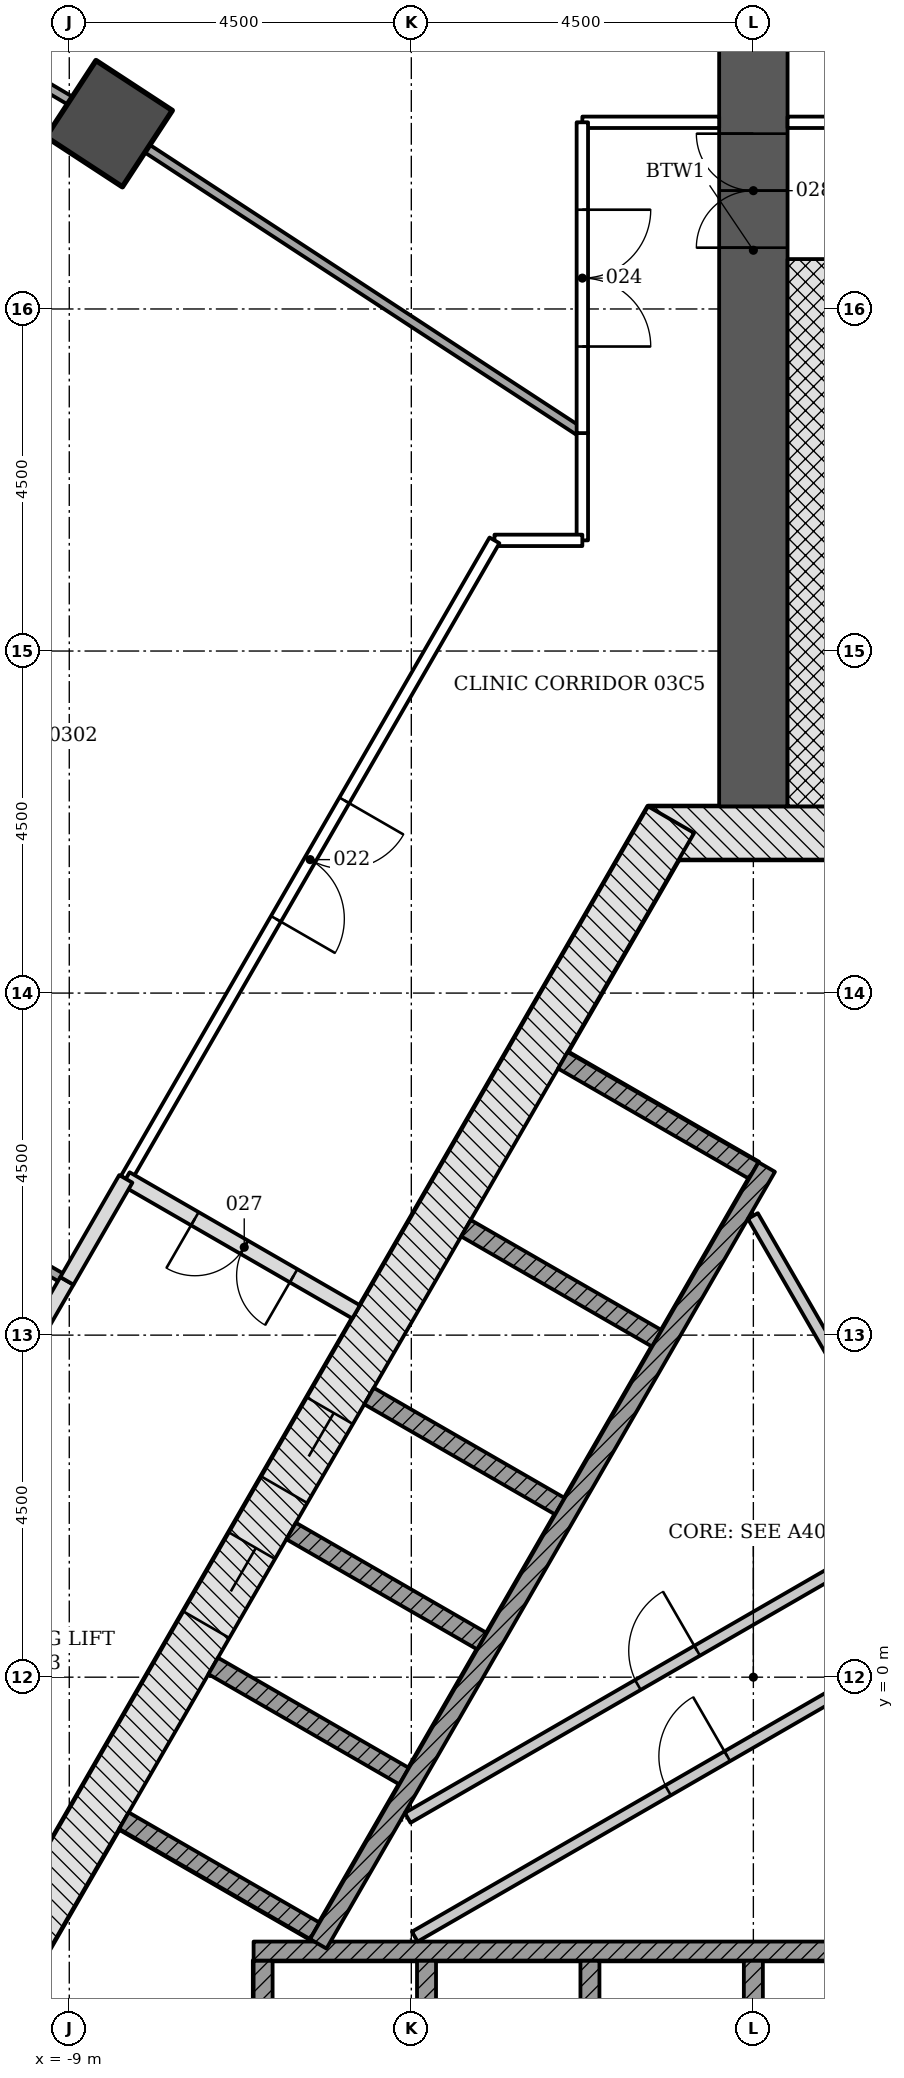
"""IFC4 building model, lengths in metres.
Left out: names, types, materials, properties, quantities, classifications, styles, units other than length and angle.
Written with IfcOpenShell. Run it as: python <this file> out.ifc"""

import sys

from ifc_helpers import new_model, si_unit, direction, frame, frame_2d, origin, origin_2d, place, context, subcontext, project, spatial, rectangle, extrude, element, fill, save


model = new_model("IFC4")
c1 = context("Model", 3, precision=1e-05, world=origin(), true_north=direction((0.0, 1.0)))
c2 = subcontext(c1, "Body", "Model", "MODEL_VIEW")
j1 = project(units=[si_unit("LENGTHUNIT", "METRE"), si_unit("PLANEANGLEUNIT", "RADIAN")], contexts=[c1])
p1 = place(None, origin())
s1 = spatial("IfcSite", under=j1, at=p1, CompositionType="ELEMENT")
p2 = place(p1, origin())
s2 = spatial("IfcBuilding", under=s1, at=p2, CompositionType="ELEMENT")
p3 = place(p2, frame((0.0, 0.0, 15.0)))
s3 = spatial("IfcBuildingStorey", under=s2, at=p3, CompositionType="ELEMENT", Elevation=15.0)
p4 = place(p3, frame((-8.475, 20.438, -0.25), z_axis=(0.0, 0.0, 1.0), x_axis=(-0.836867705394, 0.547405191489, 0.0)))
e1 = element("IfcColumn", 1, at=p4, inside=s3, PredefinedType="COLUMN", context=c2, shape_type="SweptSolid", body=[
    extrude(rectangle(XDim=1.2, YDim=1.2, at=origin_2d()), origin(), (0.0, 0.0, 1.0), 4.5),
])
p5 = place(p3, frame((10.311, -4.703, -0.25), z_axis=(0.0, 0.0, 1.0), x_axis=(-0.500001446645, 0.866024568562, 0.0)))
e2 = element("IfcWall", 2, at=p5, inside=s3, PredefinedType="SHEAR", context=c2, shape_type="SweptSolid", body=[
    extrude(rectangle(XDim=18.458, YDim=0.7, at=frame_2d((9.229, 0.0))), origin(), (0.0, 0.0, 1.0), 4.5),
])
p6 = place(p5, frame((8.7, 0.0, 0.25)))
e3 = element("IfcOpeningElement", 3, at=p6, cuts=e2, PredefinedType="OPENING", context=c2, shape_type="SweptSolid", body=[
    extrude(rectangle(XDim=1.0, YDim=2.1, at=frame_2d((0.5, 1.05))), frame((0.0, 0.36, 0.0), z_axis=(0.0, -1.0, 0.0), x_axis=(1.0, 0.0, 0.0)), (0.0, 0.0, 1.0), 0.72),
])
p7 = place(p5, frame((4.002, 0.0, 0.25)))
e4 = element("IfcOpeningElement", 4, at=p7, cuts=e2, PredefinedType="OPENING", context=c2, shape_type="SweptSolid", body=[
    extrude(rectangle(XDim=0.9, YDim=2.1, at=frame_2d((0.45, 1.05))), frame((0.0, 0.36, 0.0), z_axis=(0.0, -1.0, 0.0), x_axis=(1.0, 0.0, 0.0)), (0.0, 0.0, 1.0), 0.72),
])
p8 = place(p5, frame((14.093, 0.0, 0.25)))
e5 = element("IfcOpeningElement", 5, at=p8, cuts=e2, PredefinedType="OPENING", context=c2, shape_type="SweptSolid", body=[
    extrude(rectangle(XDim=0.9, YDim=2.1, at=frame_2d((0.45, 1.05))), frame((0.0, 0.36, 0.0), z_axis=(0.0, -1.0, 0.0), x_axis=(1.0, 0.0, 0.0)), (0.0, 0.0, 1.0), 0.72),
])
p9 = place(p3, frame((1.386, 11.106, -0.25), z_axis=(0.0, 0.0, 1.0), x_axis=(-1.0, 0.0, 0.0)))
e6 = element("IfcWall", 6, at=p9, inside=s3, PredefinedType="SHEAR", context=c2, shape_type="SweptSolid", body=[
    extrude(rectangle(XDim=2.771, YDim=0.7, at=frame_2d((1.386, 0.0))), origin(), (0.0, 0.0, 1.0), 4.5),
])
p10 = place(p3, frame((-1.083, 11.281, -0.25), z_axis=(0.0, 0.0, 1.0), x_axis=(-0.500001446645, -0.866024568562, 0.0)))
e7 = element("IfcWall", 7, at=p10, inside=s3, PredefinedType="SHEAR", context=c2, shape_type="SweptSolid", body=[
    extrude(rectangle(XDim=18.458, YDim=0.7, at=frame_2d((9.229, 0.0))), origin(), (0.0, 0.0, 1.0), 4.5),
])
p11 = place(p10, frame((8.979, 0.0, 0.25)))
e8 = element("IfcOpeningElement", 8, at=p11, cuts=e7, PredefinedType="OPENING", context=c2, shape_type="SweptSolid", body=[
    extrude(rectangle(XDim=1.2, YDim=2.1, at=frame_2d((0.6, 1.05))), frame((0.0, 0.36, 0.0), z_axis=(0.0, -1.0, 0.0), x_axis=(1.0, 0.0, 0.0)), (0.0, 0.0, 1.0), 0.72),
])
p12 = place(p10, frame((11.029, 0.0, 0.25)))
e9 = element("IfcOpeningElement", 9, at=p12, cuts=e7, PredefinedType="OPENING", context=c2, shape_type="SweptSolid", body=[
    extrude(rectangle(XDim=1.2, YDim=2.1, at=frame_2d((0.6, 1.05))), frame((0.0, 0.36, 0.0), z_axis=(0.0, -1.0, 0.0), x_axis=(1.0, 0.0, 0.0)), (0.0, 0.0, 1.0), 0.72),
])
p13 = place(p3, frame((-10.311, -4.353, -0.25), z_axis=(0.0, 0.0, 1.0), x_axis=(0.500042739161, -0.866000726912, 0.0)))
e10 = element("IfcWall", 10, at=p13, inside=s3, PredefinedType="SHEAR", context=c2, shape_type="SweptSolid", body=[
    extrude(rectangle(XDim=2.771, YDim=0.7, at=frame_2d((1.386, 0.0))), origin(), (0.0, 0.0, 1.0), 4.5),
])
p14 = place(p3, frame((0.0, 11.456, -0.25), z_axis=(0.0, 0.0, 1.0), x_axis=(0.0, 1.0, 0.0)))
e11 = element("IfcWall", 11, at=p14, inside=s3, PredefinedType="SHEAR", context=c2, shape_type="SweptSolid", body=[
    extrude(rectangle(XDim=14.633, YDim=0.9, at=frame_2d((7.316, 0.0))), origin(), (0.0, 0.0, 1.0), 4.5),
])
p15 = place(p14, frame((7.35, 0.0, 0.25)))
e12 = element("IfcOpeningElement", 12, at=p15, cuts=e11, PredefinedType="OPENING", context=c2, shape_type="SweptSolid", body=[
    extrude(rectangle(XDim=1.5, YDim=2.1, at=frame_2d((0.75, 1.05))), frame((0.0, 0.46, 0.0), z_axis=(0.0, -1.0, 0.0), x_axis=(1.0, 0.0, 0.0)), (0.0, 0.0, 1.0), 0.92),
])
for number, where, z_axis, x_axis in (
    (13, (-6.45, -6.228, -0.25), (0.0, 0.0, 1.0), (0.0, 1.0, 0.0)),
    (14, (-4.3, -6.228, -0.25), (0.0, 0.0, 1.0), (0.0, 1.0, 0.0)),
    (15, (-2.15, -6.228, -0.25), (0.0, 0.0, 1.0), (0.0, 1.0, 0.0)),
    (16, (0.0, -6.228, -0.25), (0.0, 0.0, 1.0), (0.0, 1.0, 0.0)),
):
    element("IfcWall", number, at=place(p3, frame(where, z_axis=z_axis, x_axis=x_axis)), inside=s3, PredefinedType="PARTITIONING", context=c2, shape_type="SweptSolid", body=[
        extrude(rectangle(XDim=2.5, YDim=0.25, at=frame_2d((1.25, 0.0))), origin(), (0.0, 0.0, 1.0), 4.5),
    ])
p16 = place(p3, frame((-6.575, -3.603, 0.0), z_axis=(0.0, 0.0, 1.0), x_axis=(1.0, 0.0, 0.0)))
e17 = element("IfcWall", 17, at=p16, inside=s3, PredefinedType="PARTITIONING", context=c2, shape_type="SweptSolid", body=[
    extrude(rectangle(XDim=13.15, YDim=0.25, at=frame_2d((6.575, 0.0))), origin(), (0.0, 0.0, 1.0), 4.25),
])
p17 = place(p3, frame((-2.506, 8.115, -0.25), z_axis=(0.0, 0.0, 1.0), x_axis=(0.865996321171, -0.50005036918, 0.0)))
e18 = element("IfcWall", 18, at=p17, inside=s3, PredefinedType="PARTITIONING", context=c2, shape_type="SweptSolid", body=[
    extrude(rectangle(XDim=2.9, YDim=0.25, at=frame_2d((1.45, 0.0))), origin(), (0.0, 0.0, 1.0), 4.5),
])
for number, where, z_axis, x_axis in (
    (19, (-3.781, 5.907, -0.25), (0.0, 0.0, 1.0), (0.866, -0.5, 0.0)),
    (20, (-5.056, 3.699, -0.25), (0.0, 0.0, 1.0), (0.866, -0.5, 0.0)),
    (21, (-6.081, 1.923, -0.25), (0.0, 0.0, 1.0), (0.866, -0.5, 0.0)),
    (22, (-7.106, 0.148, -0.25), (0.0, 0.0, 1.0), (0.866, -0.5, 0.0)),
    (23, (-8.281, -1.887, -0.25), (0.0, 0.0, 1.0), (0.866, -0.5, 0.0)),
):
    element("IfcWall", number, at=place(p3, frame(where, z_axis=z_axis, x_axis=x_axis)), inside=s3, PredefinedType="PARTITIONING", context=c2, shape_type="SweptSolid", body=[
        extrude(rectangle(XDim=2.9, YDim=0.25, at=frame_2d((1.45, 0.0))), origin(), (0.0, 0.0, 1.0), 4.5),
    ])
p18 = place(p3, frame((0.176, 6.711, 0.0), z_axis=(0.0, 0.0, 1.0), x_axis=(-0.500004227369, -0.866022963098, 0.0)))
e24 = element("IfcWall", 24, at=p18, inside=s3, PredefinedType="PARTITIONING", context=c2, shape_type="SweptSolid", body=[
    extrude(rectangle(XDim=11.8, YDim=0.25, at=frame_2d((5.9, 0.0))), origin(), (0.0, 0.0, 1.0), 4.25),
])
p19 = place(p3, frame((-4.548, -1.851, 0.0), z_axis=(0.0, 0.0, 1.0), x_axis=(0.866023939251, 0.500002536638, 0.0)))
e25 = element("IfcWall", 25, at=p19, inside=s3, PredefinedType="PARTITIONING", context=c2, shape_type="SweptSolid", body=[
    extrude(rectangle(XDim=11.092, YDim=0.15, at=frame_2d((5.546, 0.0))), origin(), (0.0, 0.0, 1.0), 4.25),
])
p20 = place(p19, frame((3.497, 0.0, 0.0)))
e26 = element("IfcOpeningElement", 26, at=p20, cuts=e25, PredefinedType="OPENING", context=c2, shape_type="SweptSolid", body=[
    extrude(rectangle(XDim=0.9, YDim=2.1, at=frame_2d((0.45, 1.05))), frame((0.0, 0.085, 0.0), z_axis=(0.0, -1.0, 0.0), x_axis=(1.0, 0.0, 0.0)), (0.0, 0.0, 1.0), 0.17),
])
p21 = place(p3, frame((2.099, 2.42, 0.0), z_axis=(0.0, 0.0, 1.0), x_axis=(-0.499998449073, 0.866026299211, 0.0)))
e27 = element("IfcWall", 27, at=p21, inside=s3, PredefinedType="PARTITIONING", context=c2, shape_type="SweptSolid", body=[
    extrude(rectangle(XDim=4.211, YDim=0.15, at=frame_2d((2.106, 0.0))), origin(), (0.0, 0.0, 1.0), 4.25),
])
p22 = place(p3, frame((-4.454, -3.413, 0.0), z_axis=(0.0, 0.0, 1.0), x_axis=(0.86603043987, 0.499991277142, 0.0)))
e28 = element("IfcWall", 28, at=p22, inside=s3, PredefinedType="PARTITIONING", context=c2, shape_type="SweptSolid", body=[
    extrude(rectangle(XDim=11.792, YDim=0.15, at=frame_2d((5.896, 0.0))), origin(), (0.0, 0.0, 1.0), 4.25),
])
p23 = place(p22, frame((3.847, 0.0, 0.0)))
e29 = element("IfcOpeningElement", 29, at=p23, cuts=e28, PredefinedType="OPENING", context=c2, shape_type="SweptSolid", body=[
    extrude(rectangle(XDim=0.9, YDim=2.1, at=frame_2d((0.45, 1.05))), frame((0.0, 0.085, 0.0), z_axis=(0.0, -1.0, 0.0), x_axis=(1.0, 0.0, 0.0)), (0.0, 0.0, 1.0), 0.17),
])
p24 = place(p3, frame((1.018, 11.456, -0.25), z_axis=(0.0, 0.0, 1.0), x_axis=(0.0, 1.0, 0.0)))
e30 = element("IfcWall", 30, at=p24, inside=s3, PredefinedType="SHEAR", context=c2, shape_type="SweptSolid", body=[
    extrude(rectangle(XDim=7.2, YDim=1.136, at=frame_2d((3.6, 0.0))), origin(), (0.0, 0.0, 1.0), 4.5),
])
p25 = place(p3, frame((-9.032, 5.213, 0.0), z_axis=(0.0, 0.0, 1.0), x_axis=(-0.499876332206, -0.866096791646, 0.0)))
e31 = element("IfcWall", 31, at=p25, inside=s3, PredefinedType="PARTITIONING", context=c2, shape_type="SweptSolid", body=[
    extrude(rectangle(XDim=4.349, YDim=0.2, at=frame_2d((2.175, 0.0))), origin(), (0.0, 0.0, 1.0), 3.638),
])
p26 = place(p3, frame((-5.226, 4.806, 0.0), z_axis=(0.0, 0.0, 1.0), x_axis=(-0.865949687125, 0.500131122175, 0.0)))
e32 = element("IfcWall", 32, at=p26, inside=s3, PredefinedType="PARTITIONING", context=c2, shape_type="SweptSolid", body=[
    extrude(rectangle(XDim=3.499, YDim=0.2, at=frame_2d((1.75, 0.0))), origin(), (0.0, 0.0, 1.0), 4.25),
])
p27 = place(p26, frame((0.95, 0.0, 0.0)))
e33 = element("IfcOpeningElement", 33, at=p27, cuts=e32, PredefinedType="OPENING", context=c2, shape_type="SweptSolid", body=[
    extrude(rectangle(XDim=1.5, YDim=2.1, at=frame_2d((0.75, 1.05))), frame((0.0, 0.11, 0.0), z_axis=(0.0, -1.0, 0.0), x_axis=(1.0, 0.0, 0.0)), (0.0, 0.0, 1.0), 0.22),
])
p28 = place(p3, frame((-8.256, 6.556, 0.0), z_axis=(0.0, 0.0, 1.0), x_axis=(-0.500104332946, -0.86596515875, 0.0)))
e34 = element("IfcWall", 34, at=p28, inside=s3, PredefinedType="PARTITIONING", context=c2, shape_type="SweptSolid", body=[
    extrude(rectangle(XDim=1.55, YDim=0.2, at=frame_2d((0.775, 0.0))), origin(), (0.0, 0.0, 1.0), 3.638),
])
p29 = place(p3, frame((7.136, 20.456, 0.0), z_axis=(0.0, 0.0, 1.0), x_axis=(-1.0, 0.0, 0.0)))
e35 = element("IfcWall", 35, at=p29, inside=s3, PredefinedType="PARTITIONING", context=c2, shape_type="SweptSolid", body=[
    extrude(rectangle(XDim=6.686, YDim=0.15, at=frame_2d((3.343, 0.0))), origin(), (0.0, 0.0, 1.0), 3.638),
])
p30 = place(p29, frame((2.45, 0.0, 0.0)))
e36 = element("IfcOpeningElement", 36, at=p30, cuts=e35, PredefinedType="OPENING", context=c2, shape_type="SweptSolid", body=[
    extrude(rectangle(XDim=1.8, YDim=2.1, at=frame_2d((0.9, 1.05))), frame((0.0, 0.085, 0.0), z_axis=(0.0, -1.0, 0.0), x_axis=(1.0, 0.0, 0.0)), (0.0, 0.0, 1.0), 0.17),
])
p31 = place(p3, frame((-9.033, 5.214, 0.0), z_axis=(0.0, 0.0, 1.0), x_axis=(-0.866000641544, 0.500042887006, 0.0)))
e37 = element("IfcWall", 37, at=p31, inside=s3, PredefinedType="PARTITIONING", context=c2, shape_type="SweptSolid", body=[
    extrude(rectangle(XDim=9.827, YDim=0.12, at=frame_2d((4.914, 0.0))), origin(), (0.0, 0.0, 1.0), 3.638),
])
p32 = place(p31, frame((4.45, 0.0, 0.0)))
e38 = element("IfcOpeningElement", 38, at=p32, cuts=e37, PredefinedType="OPENING", context=c2, shape_type="SweptSolid", body=[
    extrude(rectangle(XDim=1.0, YDim=2.1, at=frame_2d((0.5, 1.05))), frame((0.0, 0.07, 0.0), z_axis=(0.0, -1.0, 0.0), x_axis=(1.0, 0.0, 0.0)), (0.0, 0.0, 1.0), 0.14),
])
p33 = place(p3, frame((-2.25, 16.367, 0.0), z_axis=(0.0, 0.0, 1.0), x_axis=(0.0, -1.0, 0.0)))
e39 = element("IfcWall", 39, at=p33, inside=s3, PredefinedType="PARTITIONING", context=c2, shape_type="SweptSolid", body=[
    extrude(rectangle(XDim=1.411, YDim=0.15, at=frame_2d((0.706, 0.0))), origin(), (0.0, 0.0, 1.0), 3.638),
])
p34 = place(p3, frame((-2.25, 14.956, 0.0), z_axis=(0.0, 0.0, 1.0), x_axis=(-1.0, 0.0, 0.0)))
e40 = element("IfcWall", 40, at=p34, inside=s3, PredefinedType="PARTITIONING", context=c2, shape_type="SweptSolid", body=[
    extrude(rectangle(XDim=1.156, YDim=0.15, at=frame_2d((0.578, 0.0))), origin(), (0.0, 0.0, 1.0), 4.25),
])
p35 = place(p3, frame((-3.406, 14.956, 0.0), z_axis=(0.0, 0.0, 1.0), x_axis=(-0.500020940175, -0.866013313631, 0.0)))
e41 = element("IfcWall", 41, at=p35, inside=s3, PredefinedType="PARTITIONING", context=c2, shape_type="SweptSolid", body=[
    extrude(rectangle(XDim=9.7, YDim=0.15, at=frame_2d((4.85, 0.0))), origin(), (0.0, 0.0, 1.0), 3.638),
])
p36 = place(p35, frame((3.95, 0.0, 0.0)))
e42 = element("IfcOpeningElement", 42, at=p36, cuts=e41, PredefinedType="OPENING", context=c2, shape_type="SweptSolid", body=[
    extrude(rectangle(XDim=1.8, YDim=2.1, at=frame_2d((0.9, 1.05))), frame((0.0, 0.085, 0.0), z_axis=(0.0, -1.0, 0.0), x_axis=(1.0, 0.0, 0.0)), (0.0, 0.0, 1.0), 0.17),
])
p37 = place(p3, frame((-0.45, 20.456, 0.0), z_axis=(0.0, 0.0, 1.0), x_axis=(-1.0, 0.0, 0.0)))
e43 = element("IfcWall", 43, at=p37, inside=s3, PredefinedType="PARTITIONING", context=c2, shape_type="SweptSolid", body=[
    extrude(rectangle(XDim=1.8, YDim=0.15, at=frame_2d((0.9, 0.0))), origin(), (0.0, 0.0, 1.0), 3.638),
])
p38 = place(p3, frame((-2.25, 20.456, 0.0), z_axis=(0.0, 0.0, 1.0), x_axis=(0.0, -1.0, 0.0)))
e44 = element("IfcWall", 44, at=p38, inside=s3, PredefinedType="PARTITIONING", context=c2, shape_type="SweptSolid", body=[
    extrude(rectangle(XDim=4.089, YDim=0.15, at=frame_2d((2.044, 0.0))), origin(), (0.0, 0.0, 1.0), 3.638),
])
p39 = place(p38, frame((1.15, 0.0, 0.0)))
e45 = element("IfcOpeningElement", 45, at=p39, cuts=e44, PredefinedType="OPENING", context=c2, shape_type="SweptSolid", body=[
    extrude(rectangle(XDim=1.8, YDim=2.1, at=frame_2d((0.9, 1.05))), frame((0.0, 0.085, 0.0), z_axis=(0.0, -1.0, 0.0), x_axis=(1.0, 0.0, 0.0)), (0.0, 0.0, 1.0), 0.17),
])
p40 = place(p3, frame((-8.992, 20.743, 0.0), z_axis=(0.0, 0.0, 1.0), x_axis=(-0.861228913487, 0.508217235613, 0.0)))
e46 = element("IfcWall", 46, at=p40, inside=s3, PredefinedType="PARTITIONING", context=c2, shape_type="SweptSolid", body=[
    extrude(rectangle(XDim=2.94, YDim=0.12, at=frame_2d((1.47, 0.0))), origin(), (0.0, 0.0, 1.0), 3.633),
])
p41 = place(p3, frame((-2.252, 16.367, 0.0), z_axis=(0.0, 0.0, 1.0), x_axis=(-0.83688089218, 0.547385031129, 0.0)))
e47 = element("IfcWall", 47, at=p41, inside=s3, PredefinedType="PARTITIONING", context=c2, shape_type="SweptSolid", body=[
    extrude(rectangle(XDim=6.836, YDim=0.12, at=frame_2d((3.418, 0.0))), origin(), (0.0, 0.0, 1.0), 3.638),
])
p42 = place(p11, origin())
e48 = element("IfcDoor", 48, at=p42, inside=s3, OperationType="DOUBLE_DOOR_SLIDING", PredefinedType="DOOR", context=c2, shape_type="SweptSolid", body=[
    extrude(rectangle(XDim=1.2, YDim=2.1, at=frame_2d((0.6, 1.05))), frame((0.0, 0.025, 0.0), z_axis=(0.0, -1.0, 0.0), x_axis=(1.0, 0.0, 0.0)), (0.0, 0.0, 1.0), 0.05),
])
fill(e8, e48)
p43 = place(p12, origin())
e49 = element("IfcDoor", 49, at=p43, inside=s3, OperationType="DOUBLE_DOOR_SLIDING", PredefinedType="DOOR", context=c2, shape_type="SweptSolid", body=[
    extrude(rectangle(XDim=1.2, YDim=2.1, at=frame_2d((0.6, 1.05))), frame((0.0, 0.025, 0.0), z_axis=(0.0, -1.0, 0.0), x_axis=(1.0, 0.0, 0.0)), (0.0, 0.0, 1.0), 0.05),
])
fill(e9, e49)
p44 = place(p23, origin())
e50 = element("IfcDoor", 50, at=p44, inside=s3, OperationType="SINGLE_SWING_RIGHT", PredefinedType="DOOR", context=c2, shape_type="SweptSolid", body=[
    extrude(rectangle(XDim=0.9, YDim=2.1, at=frame_2d((0.45, 1.05))), frame((0.0, 0.025, 0.0), z_axis=(0.0, -1.0, 0.0), x_axis=(1.0, 0.0, 0.0)), (0.0, 0.0, 1.0), 0.05),
])
fill(e29, e50)
p45 = place(p20, origin())
e51 = element("IfcDoor", 51, at=p45, inside=s3, OperationType="SINGLE_SWING_RIGHT", PredefinedType="DOOR", context=c2, shape_type="SweptSolid", body=[
    extrude(rectangle(XDim=0.9, YDim=2.1, at=frame_2d((0.45, 1.05))), frame((0.0, 0.025, 0.0), z_axis=(0.0, -1.0, 0.0), x_axis=(1.0, 0.0, 0.0)), (0.0, 0.0, 1.0), 0.05),
])
fill(e26, e51)
p46 = place(p36, origin())
e52 = element("IfcDoor", 52, at=p46, inside=s3, OperationType="DOUBLE_DOOR_SINGLE_SWING", PredefinedType="DOOR", context=c2, shape_type="SweptSolid", body=[
    extrude(rectangle(XDim=1.8, YDim=2.1, at=frame_2d((0.9, 1.05))), frame((0.0, 0.025, 0.0), z_axis=(0.0, -1.0, 0.0), x_axis=(1.0, 0.0, 0.0)), (0.0, 0.0, 1.0), 0.05),
])
fill(e42, e52)
p47 = place(p39, origin())
e53 = element("IfcDoor", 53, at=p47, inside=s3, OperationType="DOUBLE_DOOR_SINGLE_SWING", PredefinedType="DOOR", context=c2, shape_type="SweptSolid", body=[
    extrude(rectangle(XDim=1.8, YDim=2.1, at=frame_2d((0.9, 1.05))), frame((0.0, 0.025, 0.0), z_axis=(0.0, -1.0, 0.0), x_axis=(1.0, 0.0, 0.0)), (0.0, 0.0, 1.0), 0.05),
])
fill(e45, e53)
p48 = place(p27, origin())
e54 = element("IfcDoor", 54, at=p48, inside=s3, OperationType="DOUBLE_DOOR_SINGLE_SWING", PredefinedType="DOOR", context=c2, shape_type="SweptSolid", body=[
    extrude(rectangle(XDim=1.5, YDim=2.1, at=frame_2d((0.75, 1.05))), frame((0.0, 0.025, 0.0), z_axis=(0.0, -1.0, 0.0), x_axis=(1.0, 0.0, 0.0)), (0.0, 0.0, 1.0), 0.05),
])
fill(e33, e54)
p49 = place(p15, origin())
e55 = element("IfcDoor", 55, at=p49, inside=s3, OperationType="DOUBLE_DOOR_SINGLE_SWING", PredefinedType="DOOR", context=c2, shape_type="SweptSolid", body=[
    extrude(rectangle(XDim=1.5, YDim=2.1, at=frame_2d((0.75, 1.05))), frame((0.0, 0.025, 0.0), z_axis=(0.0, -1.0, 0.0), x_axis=(1.0, 0.0, 0.0)), (0.0, 0.0, 1.0), 0.05),
])
fill(e12, e55)
save(model, sys.argv[1])
